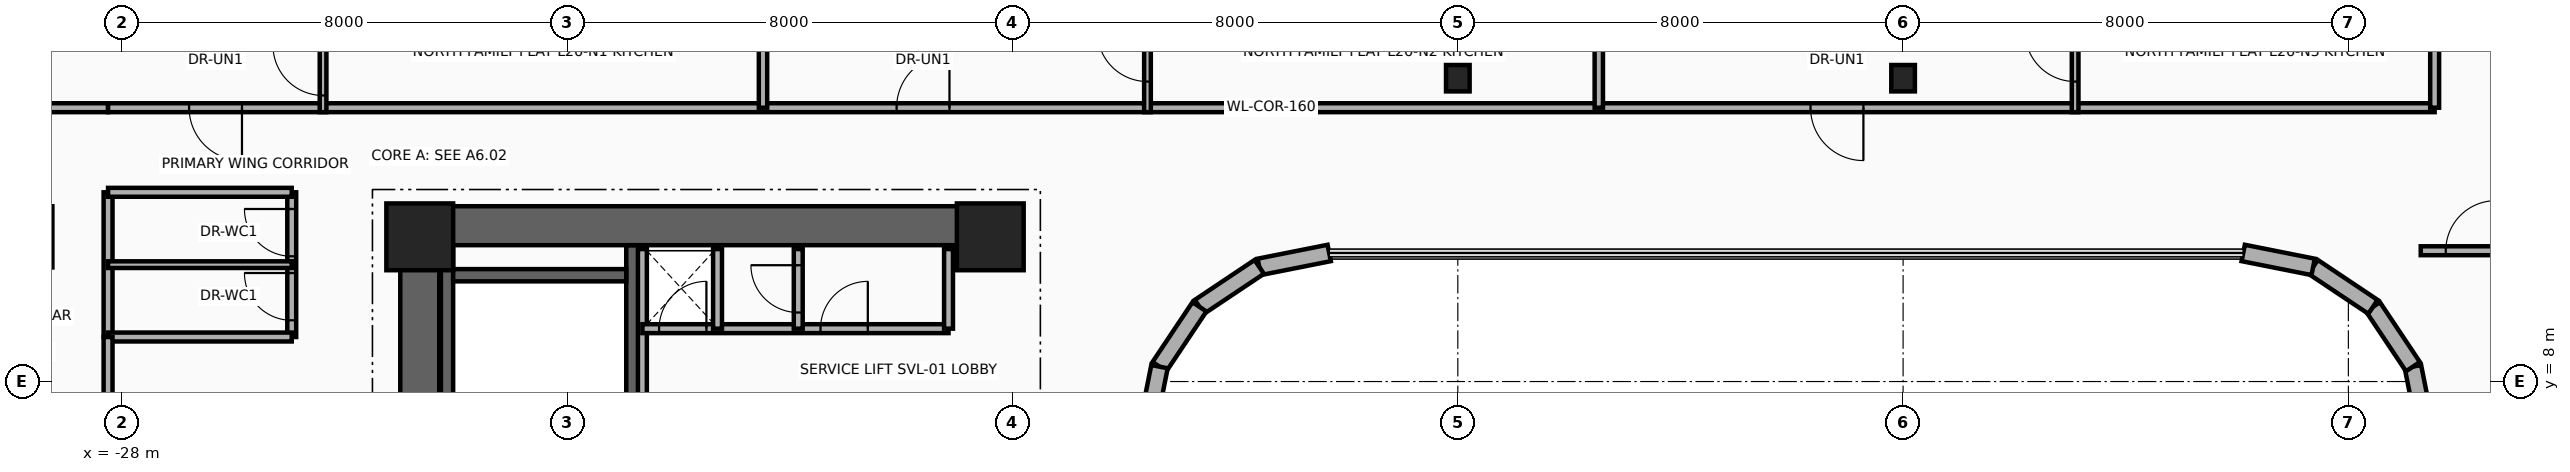
"""IFC4 building model, lengths in metres.
Left out: names, types, materials, properties, quantities, classifications, styles, units other than length and angle.
Written with IfcOpenShell. Run it as: python <this file> out.ifc"""

import sys

from ifc_helpers import new_model, si_unit, direction, frame, frame_2d, origin, origin_2d, place, context, subcontext, project, spatial, rectangle, i_section, extrude, source, transform, mapped, element, fill, save


model = new_model("IFC4")
c1 = context("Model", 3, precision=1e-05, world=origin(), true_north=direction((0.0, 1.0)))
c2 = subcontext(c1, "Body", "Model", "MODEL_VIEW")
j1 = project(units=[si_unit("LENGTHUNIT", "METRE"), si_unit("PLANEANGLEUNIT", "RADIAN")], contexts=[c1])
p1 = place(None, origin())
s1 = spatial("IfcSite", under=j1, at=p1, CompositionType="ELEMENT")
p2 = place(p1, origin())
s2 = spatial("IfcBuilding", under=s1, at=p2, CompositionType="ELEMENT")
p3 = place(p2, frame((0.0, 0.0, 105.7)))
s3 = spatial("IfcBuildingStorey", under=s2, at=p3, CompositionType="ELEMENT", Elevation=105.7)
for number, where, z_axis, x_axis in (
    (1, (-22.16, 1.78, 0.0), (0.0, 0.0, 1.0), (0.0, 1.0, 0.0)),
    (2, (-18.83, 1.78, 0.0), (0.0, 0.0, 1.0), (0.0, 1.0, 0.0)),
):
    element("IfcWall", number, at=place(p3, frame(where, z_axis=z_axis, x_axis=x_axis)), inside=s3, PredefinedType="SHEAR", context=c2, shape_type="SweptSolid", body=[
        extrude(rectangle(XDim=8.67, YDim=0.22, at=frame_2d((4.335, 0.0))), origin(), (0.0, 0.0, 1.0), 3.46),
    ])
p4 = place(p3, frame((-22.05, 9.91, 0.0), z_axis=(0.0, 0.0, 1.0), x_axis=(1.0, 0.0, 0.0)))
e3 = element("IfcWall", 3, at=p4, inside=s3, PredefinedType="SHEAR", context=c2, shape_type="SweptSolid", body=[
    extrude(rectangle(XDim=3.11, YDim=0.22, at=frame_2d((1.555, 0.0))), origin(), (0.0, 0.0, 1.0), 3.46),
])
p5 = place(p3, frame((-22.65, -11.15, 0.0), z_axis=(0.0, 0.0, 1.0), x_axis=(0.0, 1.0, 0.0)))
e4 = element("IfcWall", 4, at=p5, inside=s3, PredefinedType="SHEAR", context=c2, shape_type="SweptSolid", body=[
    extrude(rectangle(XDim=22.3, YDim=0.7, at=frame_2d((11.15, 0.0))), origin(), (0.0, 0.0, 1.0), 3.46),
])
p6 = place(p3, frame((-22.65, 10.8, 0.0), z_axis=(0.0, 0.0, 1.0), x_axis=(1.0, 0.0, 0.0)))
e5 = element("IfcWall", 5, at=p6, inside=s3, PredefinedType="SHEAR", context=c2, shape_type="SweptSolid", body=[
    extrude(rectangle(XDim=10.25, YDim=0.7, at=frame_2d((5.125, 0.0))), origin(), (0.0, 0.0, 1.0), 3.46),
])
m1 = source(origin(), c2, "Body", "SweptSolid", [
    extrude(rectangle(XDim=1.2, YDim=1.2, at=origin_2d()), origin(), (0.0, 0.0, 1.0), 3.7),
])
for number, where, z_axis, x_axis in (
    (6, (-22.65, 10.6, 0.0), (0.0, 0.0, 1.0), (1.0, 0.0, 0.0)),
    (7, (-12.4, 10.6, 0.0), (0.0, 0.0, 1.0), (1.0, 0.0, 0.0)),
):
    element("IfcColumn", number, at=place(p3, frame(where, z_axis=z_axis, x_axis=x_axis)), inside=s3, PredefinedType="COLUMN", context=c2, shape_type="MappedRepresentation", body=[
        mapped(m1, transform((0.0, 0.0, 0.0), x_axis=(1.0, 0.0, 0.0), y_axis=(0.0, 1.0, 0.0), z_axis=(0.0, 0.0, 1.0), scale=1.0)),
    ])
m2 = source(origin(), c2, "Body", "SweptSolid", [
    extrude(i_section(OverallWidth=0.424, OverallDepth=0.474, WebThickness=0.048, FlangeThickness=0.077, at=origin_2d()), origin(), (0.0, 0.0, 1.0), 3.7),
])
for number, where, z_axis, x_axis in (
    (8, (-4.0, 13.45, 0.0), (0.0, 0.0, 1.0), (1.0, 0.0, 0.0)),
    (9, (4.0, 13.45, 0.0), (0.0, 0.0, 1.0), (1.0, 0.0, 0.0)),
):
    element("IfcColumn", number, at=place(p3, frame(where, z_axis=z_axis, x_axis=x_axis)), inside=s3, PredefinedType="COLUMN", context=c2, shape_type="MappedRepresentation", body=[
        mapped(m2, transform((0.0, 0.0, 0.0), x_axis=(1.0, 0.0, 0.0), y_axis=(0.0, 1.0, 0.0), z_axis=(0.0, 0.0, 1.0), scale=1.0)),
    ])
p7 = place(p3, frame((13.41, 7.011, 0.0), z_axis=(0.0, 0.0, 1.0), x_axis=(-0.195090163074, 0.980785312019, 0.0)))
e10 = element("IfcWall", 10, at=p7, inside=s3, PredefinedType="SOLIDWALL", context=c2, shape_type="SweptSolid", body=[
    extrude(rectangle(XDim=1.281, YDim=0.3, at=frame_2d((0.641, 0.0))), origin(), (0.0, 0.0, 1.0), 3.46),
])
for number, where, z_axis, x_axis in (
    (11, (13.16, 8.268, 0.0), (0.0, 0.0, 1.0), (-0.556, 0.831, 0.0)),
    (12, (12.442, 9.342, 0.0), (0.0, 0.0, 1.0), (-0.831, 0.556, 0.0)),
):
    element("IfcWall", number, at=place(p3, frame(where, z_axis=z_axis, x_axis=x_axis)), inside=s3, PredefinedType="SOLIDWALL", context=c2, shape_type="SweptSolid", body=[
        extrude(rectangle(XDim=1.292, YDim=0.3, at=frame_2d((0.646, 0.0))), origin(), (0.0, 0.0, 1.0), 3.46),
    ])
for number, where, z_axis, x_axis in (
    (13, (11.367, 10.06, 0.0), (0.0, 0.0, 1.0), (-0.981, 0.195, 0.0)),
    (14, (-6.311, 10.31, 0.0), (0.0, 0.0, 1.0), (-0.981, -0.195, 0.0)),
):
    element("IfcWall", number, at=place(p3, frame(where, z_axis=z_axis, x_axis=x_axis)), inside=s3, PredefinedType="SOLIDWALL", context=c2, shape_type="SweptSolid", body=[
        extrude(rectangle(XDim=1.281, YDim=0.3, at=frame_2d((0.641, 0.0))), origin(), (0.0, 0.0, 1.0), 3.46),
    ])
p8 = place(p3, frame((-7.567, 10.06, 0.0), z_axis=(0.0, 0.0, 1.0), x_axis=(-0.831497739511, -0.555528135371, 0.0)))
e15 = element("IfcWall", 15, at=p8, inside=s3, PredefinedType="SOLIDWALL", context=c2, shape_type="SweptSolid", body=[
    extrude(rectangle(XDim=1.292, YDim=0.3, at=frame_2d((0.646, 0.0))), origin(), (0.0, 0.0, 1.0), 3.46),
])
p9 = place(p3, frame((-8.642, 9.342, 0.0), z_axis=(0.0, 0.0, 1.0), x_axis=(-0.555615398575, -0.831439431869, 0.0)))
e16 = element("IfcWall", 16, at=p9, inside=s3, PredefinedType="SOLIDWALL", context=c2, shape_type="SweptSolid", body=[
    extrude(rectangle(XDim=1.292, YDim=0.3, at=frame_2d((0.646, 0.0))), origin(), (0.0, 0.0, 1.0), 3.46),
])
p10 = place(p3, frame((-9.36, 8.268, 0.0), z_axis=(0.0, 0.0, 1.0), x_axis=(-0.195090163074, -0.980785312019, 0.0)))
e17 = element("IfcWall", 17, at=p10, inside=s3, PredefinedType="SOLIDWALL", context=c2, shape_type="SweptSolid", body=[
    extrude(rectangle(XDim=1.281, YDim=0.3, at=frame_2d((0.641, 0.0))), origin(), (0.0, 0.0, 1.0), 3.46),
])
p11 = place(p3, frame((-18.65, 7.45, 0.0), z_axis=(0.0, 0.0, 1.0), x_axis=(0.0, 1.0, 0.0)))
e18 = element("IfcWall", 18, at=p11, inside=s3, PredefinedType="PARTITIONING", context=c2, shape_type="SweptSolid", body=[
    extrude(rectangle(XDim=2.93, YDim=0.16, at=frame_2d((1.465, 0.0))), origin(), (0.0, 0.0, 1.0), 3.46),
])
p12 = place(p3, frame((-18.65, 8.95, 0.0), z_axis=(0.0, 0.0, 1.0), x_axis=(1.0, 0.0, 0.0)))
e19 = element("IfcWall", 19, at=p12, inside=s3, PredefinedType="PARTITIONING", context=c2, shape_type="SweptSolid", body=[
    extrude(rectangle(XDim=5.5, YDim=0.16, at=frame_2d((2.75, 0.0))), origin(), (0.0, 0.0, 1.0), 3.46),
])
p13 = place(p12, frame((0.3, 0.0, 0.0)))
e20 = element("IfcOpeningElement", 20, at=p13, cuts=e19, PredefinedType="OPENING", context=c2, shape_type="SweptSolid", body=[
    extrude(rectangle(XDim=0.85, YDim=2.05, at=frame_2d((0.425, 1.025))), frame((0.0, 0.095, 0.0), z_axis=(0.0, -1.0, 0.0), x_axis=(1.0, 0.0, 0.0)), (0.0, 0.0, 1.0), 0.19),
])
p14 = place(p12, frame((3.2, 0.0, 0.0)))
e21 = element("IfcOpeningElement", 21, at=p14, cuts=e19, PredefinedType="OPENING", context=c2, shape_type="SweptSolid", body=[
    extrude(rectangle(XDim=0.85, YDim=2.05, at=frame_2d((0.425, 1.025))), frame((0.0, 0.095, 0.0), z_axis=(0.0, -1.0, 0.0), x_axis=(1.0, 0.0, 0.0)), (0.0, 0.0, 1.0), 0.19),
])
for number, where, z_axis, x_axis in (
    (22, (-13.15, 8.95, 0.0), (0.0, 0.0, 1.0), (0.0, 1.0, 0.0)),
    (23, (-17.3, 8.95, 0.0), (0.0, 0.0, 1.0), (0.0, 1.0, 0.0)),
):
    element("IfcWall", number, at=place(p3, frame(where, z_axis=z_axis, x_axis=x_axis)), inside=s3, PredefinedType="PARTITIONING", context=c2, shape_type="SweptSolid", body=[
        extrude(rectangle(XDim=1.43, YDim=0.16, at=frame_2d((0.715, 0.0))), origin(), (0.0, 0.0, 1.0), 3.46),
    ])
p15 = place(p3, frame((-15.85, 8.95, 0.0), z_axis=(0.0, 0.0, 1.0), x_axis=(0.0, 1.0, 0.0)))
e24 = element("IfcWall", 24, at=p15, inside=s3, PredefinedType="PARTITIONING", context=c2, shape_type="SweptSolid", body=[
    extrude(rectangle(XDim=1.43, YDim=0.16, at=frame_2d((0.715, 0.0))), origin(), (0.0, 0.0, 1.0), 3.46),
])
p16 = place(p15, frame((0.29, 0.0, 0.0)))
e25 = element("IfcOpeningElement", 25, at=p16, cuts=e24, PredefinedType="OPENING", context=c2, shape_type="SweptSolid", body=[
    extrude(rectangle(XDim=0.85, YDim=2.05, at=frame_2d((0.425, 1.025))), frame((0.0, 0.095, 0.0), z_axis=(0.0, -1.0, 0.0), x_axis=(1.0, 0.0, 0.0)), (0.0, 0.0, 1.0), 0.19),
])
p17 = place(p3, frame((-28.25, 8.8, 0.0), z_axis=(0.0, 0.0, 1.0), x_axis=(0.0, 1.0, 0.0)))
e26 = element("IfcWall", 26, at=p17, inside=s3, PredefinedType="PARTITIONING", context=c2, shape_type="SweptSolid", body=[
    extrude(rectangle(XDim=2.6, YDim=0.16, at=frame_2d((1.3, 0.0))), origin(), (0.0, 0.0, 1.0), 2.666),
])
p18 = place(p3, frame((-24.95, 8.8, 0.0), z_axis=(0.0, 0.0, 1.0), x_axis=(0.0, 1.0, 0.0)))
e27 = element("IfcWall", 27, at=p18, inside=s3, PredefinedType="PARTITIONING", context=c2, shape_type="SweptSolid", body=[
    extrude(rectangle(XDim=2.6, YDim=0.16, at=frame_2d((1.3, 0.0))), origin(), (0.0, 0.0, 1.0), 2.666),
])
p19 = place(p18, frame((0.3, 0.0, 0.0)))
e28 = element("IfcOpeningElement", 28, at=p19, cuts=e27, PredefinedType="OPENING", context=c2, shape_type="SweptSolid", body=[
    extrude(rectangle(XDim=0.85, YDim=2.1, at=frame_2d((0.425, 1.05))), frame((0.0, 0.095, 0.0), z_axis=(0.0, -1.0, 0.0), x_axis=(1.0, 0.0, 0.0)), (0.0, 0.0, 1.0), 0.19),
])
p20 = place(p18, frame((1.45, 0.0, 0.0)))
e29 = element("IfcOpeningElement", 29, at=p20, cuts=e27, PredefinedType="OPENING", context=c2, shape_type="SweptSolid", body=[
    extrude(rectangle(XDim=0.85, YDim=2.1, at=frame_2d((0.425, 1.05))), frame((0.0, 0.095, 0.0), z_axis=(0.0, -1.0, 0.0), x_axis=(1.0, 0.0, 0.0)), (0.0, 0.0, 1.0), 0.19),
])
for number, where, z_axis, x_axis in (
    (30, (-28.25, 8.8, 0.0), (0.0, 0.0, 1.0), (1.0, 0.0, 0.0)),
    (31, (-28.25, 11.4, 0.0), (0.0, 0.0, 1.0), (1.0, 0.0, 0.0)),
):
    element("IfcWall", number, at=place(p3, frame(where, z_axis=z_axis, x_axis=x_axis)), inside=s3, PredefinedType="PARTITIONING", context=c2, shape_type="SweptSolid", body=[
        extrude(rectangle(XDim=3.3, YDim=0.16, at=frame_2d((1.65, 0.0))), origin(), (0.0, 0.0, 1.0), 3.46),
    ])
p21 = place(p3, frame((-28.25, 10.1, 0.0), z_axis=(0.0, 0.0, 1.0), x_axis=(1.0, 0.0, 0.0)))
e32 = element("IfcWall", 32, at=p21, inside=s3, PredefinedType="PARTITIONING", context=c2, shape_type="SweptSolid", body=[
    extrude(rectangle(XDim=3.3, YDim=0.12, at=frame_2d((1.65, 0.0))), origin(), (0.0, 0.0, 1.0), 3.46),
])
p22 = place(p3, frame((-28.25, 7.2, 0.0), z_axis=(0.0, 0.0, 1.0), x_axis=(0.0, 1.0, 0.0)))
e33 = element("IfcWall", 33, at=p22, inside=s3, PredefinedType="PARTITIONING", context=c2, shape_type="SweptSolid", body=[
    extrude(rectangle(XDim=1.6, YDim=0.16, at=frame_2d((0.8, 0.0))), origin(), (0.0, 0.0, 1.0), 2.988),
])
p23 = place(p3, frame((-30.89, 12.92, 0.0), z_axis=(0.0, 0.0, 1.0), x_axis=(1.0, 0.0, 0.0)))
e34 = element("IfcWall", 34, at=p23, inside=s3, PredefinedType="PARTITIONING", context=c2, shape_type="SweptSolid", body=[
    extrude(rectangle(XDim=2.64, YDim=0.16, at=frame_2d((1.32, 0.0))), origin(), (0.0, 0.0, 1.0), 2.896),
])
p24 = place(p3, frame((-28.25, 12.92, 0.0), z_axis=(0.0, 0.0, 1.0), x_axis=(1.0, 0.0, 0.0)))
e35 = element("IfcWall", 35, at=p24, inside=s3, PredefinedType="PARTITIONING", context=c2, shape_type="SweptSolid", body=[
    extrude(rectangle(XDim=41.8, YDim=0.16, at=frame_2d((20.9, 0.0))), origin(), (0.0, 0.0, 1.0), 2.666),
])
p25 = place(p24, frame((1.456, 0.0, 0.0)))
e36 = element("IfcOpeningElement", 36, at=p25, cuts=e35, PredefinedType="OPENING", context=c2, shape_type="SweptSolid", body=[
    extrude(rectangle(XDim=0.95, YDim=2.15, at=frame_2d((0.475, 1.075))), frame((0.0, 0.095, 0.0), z_axis=(0.0, -1.0, 0.0), x_axis=(1.0, 0.0, 0.0)), (0.0, 0.0, 1.0), 0.19),
])
p26 = place(p24, frame((14.167, 0.0, 0.0)))
e37 = element("IfcOpeningElement", 37, at=p26, cuts=e35, PredefinedType="OPENING", context=c2, shape_type="SweptSolid", body=[
    extrude(rectangle(XDim=0.95, YDim=2.15, at=frame_2d((0.475, 1.075))), frame((0.0, 0.095, 0.0), z_axis=(0.0, -1.0, 0.0), x_axis=(1.0, 0.0, 0.0)), (0.0, 0.0, 1.0), 0.19),
])
p27 = place(p24, frame((30.587, 0.0, 0.0)))
e38 = element("IfcOpeningElement", 38, at=p27, cuts=e35, PredefinedType="OPENING", context=c2, shape_type="SweptSolid", body=[
    extrude(rectangle(XDim=0.95, YDim=2.15, at=frame_2d((0.475, 1.075))), frame((0.0, 0.095, 0.0), z_axis=(0.0, -1.0, 0.0), x_axis=(1.0, 0.0, 0.0)), (0.0, 0.0, 1.0), 0.19),
])
p28 = place(p3, frame((13.55, 12.92, 0.0), z_axis=(0.0, 0.0, 1.0), x_axis=(0.0, 1.0, 0.0)))
e39 = element("IfcWall", 39, at=p28, inside=s3, PredefinedType="PARTITIONING", context=c2, shape_type="SweptSolid", body=[
    extrude(rectangle(XDim=5.857, YDim=0.16, at=frame_2d((2.928, 0.0))), origin(), (0.0, 0.0, 1.0), 2.666),
])
p29 = place(p3, frame((-16.483, 12.92, 0.0), z_axis=(0.0, 0.0, 1.0), x_axis=(0.0, 1.0, 0.0)))
e40 = element("IfcWall", 40, at=p29, inside=s3, PredefinedType="PARTITIONING", context=c2, shape_type="SweptSolid", body=[
    extrude(rectangle(XDim=7.004, YDim=0.15, at=frame_2d((3.502, 0.0))), origin(), (0.0, 0.0, 1.0), 2.666),
])
p30 = place(p3, frame((-1.467, 12.92, 0.0), z_axis=(0.0, 0.0, 1.0), x_axis=(0.0, 1.0, 0.0)))
e41 = element("IfcWall", 41, at=p30, inside=s3, PredefinedType="PARTITIONING", context=c2, shape_type="SweptSolid", body=[
    extrude(rectangle(XDim=7.037, YDim=0.15, at=frame_2d((3.518, 0.0))), origin(), (0.0, 0.0, 1.0), 2.666),
])
p31 = place(p3, frame((-24.387, 12.84, 0.0), z_axis=(0.0, 0.0, 1.0), x_axis=(0.0, 1.0, 0.0)))
e42 = element("IfcWall", 42, at=p31, inside=s3, PredefinedType="PARTITIONING", context=c2, shape_type="SweptSolid", body=[
    extrude(rectangle(XDim=2.08, YDim=0.12, at=frame_2d((1.04, 0.0))), origin(), (0.0, 0.0, 1.0), 2.666),
])
p32 = place(p31, frame((0.3, 0.0, 0.0)))
e43 = element("IfcOpeningElement", 43, at=p32, cuts=e42, PredefinedType="OPENING", context=c2, shape_type="SweptSolid", body=[
    extrude(rectangle(XDim=0.9, YDim=2.1, at=frame_2d((0.45, 1.05))), frame((0.0, 0.075, 0.0), z_axis=(0.0, -1.0, 0.0), x_axis=(1.0, 0.0, 0.0)), (0.0, 0.0, 1.0), 0.15),
])
p33 = place(p3, frame((-9.576, 12.84, 0.0), z_axis=(0.0, 0.0, 1.0), x_axis=(0.0, 1.0, 0.0)))
e44 = element("IfcWall", 44, at=p33, inside=s3, PredefinedType="PARTITIONING", context=c2, shape_type="SweptSolid", body=[
    extrude(rectangle(XDim=2.08, YDim=0.12, at=frame_2d((1.04, 0.0))), origin(), (0.0, 0.0, 1.0), 2.666),
])
p34 = place(p33, frame((0.55, 0.0, 0.0)))
e45 = element("IfcOpeningElement", 45, at=p34, cuts=e44, PredefinedType="OPENING", context=c2, shape_type="SweptSolid", body=[
    extrude(rectangle(XDim=0.9, YDim=2.1, at=frame_2d((0.45, 1.05))), frame((0.0, 0.075, 0.0), z_axis=(0.0, -1.0, 0.0), x_axis=(1.0, 0.0, 0.0)), (0.0, 0.0, 1.0), 0.15),
])
p35 = place(p3, frame((7.091, 12.84, 0.0), z_axis=(0.0, 0.0, 1.0), x_axis=(0.0, 1.0, 0.0)))
e46 = element("IfcWall", 46, at=p35, inside=s3, PredefinedType="PARTITIONING", context=c2, shape_type="SweptSolid", body=[
    extrude(rectangle(XDim=2.08, YDim=0.12, at=frame_2d((1.04, 0.0))), origin(), (0.0, 0.0, 1.0), 2.666),
])
p36 = place(p35, frame((0.55, 0.0, 0.0)))
e47 = element("IfcOpeningElement", 47, at=p36, cuts=e46, PredefinedType="OPENING", context=c2, shape_type="SweptSolid", body=[
    extrude(rectangle(XDim=0.9, YDim=2.1, at=frame_2d((0.45, 1.05))), frame((0.0, 0.075, 0.0), z_axis=(0.0, -1.0, 0.0), x_axis=(1.0, 0.0, 0.0)), (0.0, 0.0, 1.0), 0.15),
])
p37 = place(p3, frame((13.3, 10.35, 0.0), z_axis=(0.0, 0.0, 1.0), x_axis=(1.0, 0.0, 0.0)))
e48 = element("IfcWall", 48, at=p37, inside=s3, PredefinedType="PARTITIONING", context=c2, shape_type="SweptSolid", body=[
    extrude(rectangle(XDim=2.1, YDim=0.16, at=frame_2d((1.05, 0.0))), origin(), (0.0, 0.0, 1.0), 2.666),
])
p38 = place(p37, frame((0.45, 0.0, 0.0)))
e49 = element("IfcOpeningElement", 49, at=p38, cuts=e48, PredefinedType="OPENING", context=c2, shape_type="SweptSolid", body=[
    extrude(rectangle(XDim=0.9, YDim=2.1, at=frame_2d((0.45, 1.05))), frame((0.0, 0.095, 0.0), z_axis=(0.0, -1.0, 0.0), x_axis=(1.0, 0.0, 0.0)), (0.0, 0.0, 1.0), 0.19),
])
p39 = place(p13, origin())
e50 = element("IfcDoor", 50, at=p39, inside=s3, OperationType="SINGLE_SWING_LEFT", PredefinedType="DOOR", context=c2, shape_type="SweptSolid", body=[
    extrude(rectangle(XDim=0.85, YDim=2.05, at=frame_2d((0.425, 1.025))), frame((0.0, 0.025, 0.0), z_axis=(0.0, -1.0, 0.0), x_axis=(1.0, 0.0, 0.0)), (0.0, 0.0, 1.0), 0.05),
])
fill(e20, e50)
p40 = place(p14, origin())
e51 = element("IfcDoor", 51, at=p40, inside=s3, OperationType="SINGLE_SWING_RIGHT", PredefinedType="DOOR", context=c2, shape_type="SweptSolid", body=[
    extrude(rectangle(XDim=0.85, YDim=2.05, at=frame_2d((0.425, 1.025))), frame((0.0, 0.025, 0.0), z_axis=(0.0, -1.0, 0.0), x_axis=(1.0, 0.0, 0.0)), (0.0, 0.0, 1.0), 0.05),
])
fill(e21, e51)
p41 = place(p16, origin())
e52 = element("IfcDoor", 52, at=p41, inside=s3, OperationType="SINGLE_SWING_LEFT", PredefinedType="DOOR", context=c2, shape_type="SweptSolid", body=[
    extrude(rectangle(XDim=0.85, YDim=2.05, at=frame_2d((0.425, 1.025))), frame((0.0, 0.025, 0.0), z_axis=(0.0, -1.0, 0.0), x_axis=(1.0, 0.0, 0.0)), (0.0, 0.0, 1.0), 0.05),
])
fill(e25, e52)
p42 = place(p19, origin())
e53 = element("IfcDoor", 53, at=p42, inside=s3, OperationType="SINGLE_SWING_RIGHT", PredefinedType="DOOR", context=c2, shape_type="SweptSolid", body=[
    extrude(rectangle(XDim=0.85, YDim=2.1, at=frame_2d((0.425, 1.05))), frame((0.0, 0.025, 0.0), z_axis=(0.0, -1.0, 0.0), x_axis=(1.0, 0.0, 0.0)), (0.0, 0.0, 1.0), 0.05),
])
fill(e28, e53)
p43 = place(p20, origin())
e54 = element("IfcDoor", 54, at=p43, inside=s3, OperationType="SINGLE_SWING_LEFT", PredefinedType="DOOR", context=c2, shape_type="SweptSolid", body=[
    extrude(rectangle(XDim=0.85, YDim=2.1, at=frame_2d((0.425, 1.05))), frame((0.0, 0.025, 0.0), z_axis=(0.0, -1.0, 0.0), x_axis=(1.0, 0.0, 0.0)), (0.0, 0.0, 1.0), 0.05),
])
fill(e29, e54)
p44 = place(p25, frame((0.95, 0.0, 0.0), z_axis=(0.0, 0.0, 1.0), x_axis=(-1.0, 0.0, 0.0)))
e55 = element("IfcDoor", 55, at=p44, inside=s3, OperationType="SINGLE_SWING_LEFT", PredefinedType="DOOR", context=c2, shape_type="SweptSolid", body=[
    extrude(rectangle(XDim=0.95, YDim=2.15, at=frame_2d((0.475, 1.075))), frame((0.0, 0.025, 0.0), z_axis=(0.0, -1.0, 0.0), x_axis=(1.0, 0.0, 0.0)), (0.0, 0.0, 1.0), 0.05),
])
fill(e36, e55)
p45 = place(p32, origin())
e56 = element("IfcDoor", 56, at=p45, inside=s3, OperationType="SINGLE_SWING_LEFT", PredefinedType="DOOR", context=c2, shape_type="SweptSolid", body=[
    extrude(rectangle(XDim=0.9, YDim=2.1, at=frame_2d((0.45, 1.05))), frame((0.0, 0.025, 0.0), z_axis=(0.0, -1.0, 0.0), x_axis=(1.0, 0.0, 0.0)), (0.0, 0.0, 1.0), 0.05),
])
fill(e43, e56)
p46 = place(p26, origin())
e57 = element("IfcDoor", 57, at=p46, inside=s3, OperationType="SINGLE_SWING_RIGHT", PredefinedType="DOOR", context=c2, shape_type="SweptSolid", body=[
    extrude(rectangle(XDim=0.95, YDim=2.15, at=frame_2d((0.475, 1.075))), frame((0.0, 0.025, 0.0), z_axis=(0.0, -1.0, 0.0), x_axis=(1.0, 0.0, 0.0)), (0.0, 0.0, 1.0), 0.05),
])
fill(e37, e57)
p47 = place(p34, origin())
e58 = element("IfcDoor", 58, at=p47, inside=s3, OperationType="SINGLE_SWING_RIGHT", PredefinedType="DOOR", context=c2, shape_type="SweptSolid", body=[
    extrude(rectangle(XDim=0.9, YDim=2.1, at=frame_2d((0.45, 1.05))), frame((0.0, 0.025, 0.0), z_axis=(0.0, -1.0, 0.0), x_axis=(1.0, 0.0, 0.0)), (0.0, 0.0, 1.0), 0.05),
])
fill(e45, e58)
p48 = place(p27, frame((0.95, 0.0, 0.0), z_axis=(0.0, 0.0, 1.0), x_axis=(-1.0, 0.0, 0.0)))
e59 = element("IfcDoor", 59, at=p48, inside=s3, OperationType="SINGLE_SWING_LEFT", PredefinedType="DOOR", context=c2, shape_type="SweptSolid", body=[
    extrude(rectangle(XDim=0.95, YDim=2.15, at=frame_2d((0.475, 1.075))), frame((0.0, 0.025, 0.0), z_axis=(0.0, -1.0, 0.0), x_axis=(1.0, 0.0, 0.0)), (0.0, 0.0, 1.0), 0.05),
])
fill(e38, e59)
p49 = place(p36, origin())
e60 = element("IfcDoor", 60, at=p49, inside=s3, OperationType="SINGLE_SWING_LEFT", PredefinedType="DOOR", context=c2, shape_type="SweptSolid", body=[
    extrude(rectangle(XDim=0.9, YDim=2.1, at=frame_2d((0.45, 1.05))), frame((0.0, 0.025, 0.0), z_axis=(0.0, -1.0, 0.0), x_axis=(1.0, 0.0, 0.0)), (0.0, 0.0, 1.0), 0.05),
])
fill(e47, e60)
p50 = place(p38, origin())
e61 = element("IfcDoor", 61, at=p50, inside=s3, OperationType="SINGLE_SWING_RIGHT", PredefinedType="DOOR", context=c2, shape_type="SweptSolid", body=[
    extrude(rectangle(XDim=0.9, YDim=2.1, at=frame_2d((0.45, 1.05))), frame((0.0, 0.025, 0.0), z_axis=(0.0, -1.0, 0.0), x_axis=(1.0, 0.0, 0.0)), (0.0, 0.0, 1.0), 0.05),
])
fill(e49, e61)
save(model, sys.argv[1])
